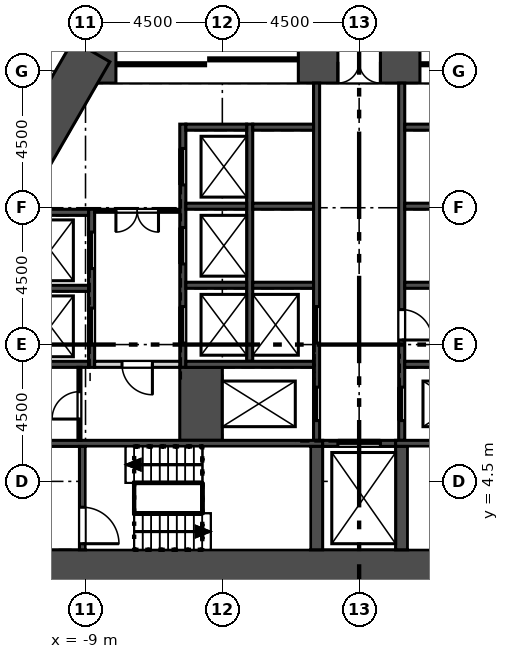
"""IFC4 building model, lengths in metres.
Left out: names, types, materials, properties, quantities, classifications, styles, units other than length and angle.
Written with IfcOpenShell. Run it as: python <this file> out.ifc"""

import sys

from ifc_helpers import new_model, si_unit, direction, frame, frame_2d, origin, place, context, subcontext, project, spatial, rectangle, extrude, element, fill, save


model = new_model("IFC4")
c1 = context("Model", 3, precision=1e-05, world=origin(), true_north=direction((0.0, 1.0)))
c2 = subcontext(c1, "Body", "Model", "MODEL_VIEW")
j1 = project(units=[si_unit("LENGTHUNIT", "METRE"), si_unit("PLANEANGLEUNIT", "RADIAN")], contexts=[c1])
p1 = place(None, origin())
s1 = spatial("IfcSite", under=j1, at=p1, CompositionType="ELEMENT")
p2 = place(p1, origin())
s2 = spatial("IfcBuilding", under=s1, at=p2, CompositionType="ELEMENT")
p3 = place(p2, frame((0.0, 0.0, 8.0)))
s3 = spatial("IfcBuildingStorey", under=s2, at=p3, CompositionType="ELEMENT", Elevation=8.0)
p4 = place(p3, frame((-14.0, 1.55, 0.0), z_axis=(0.0, 0.0, 1.0), x_axis=(1.0, 0.0, 0.0)))
e1 = element("IfcWall", 1, at=p4, inside=s3, PredefinedType="SHEAR", context=c2, shape_type="SweptSolid", body=[
    extrude(rectangle(XDim=28.0, YDim=1.4, at=frame_2d((14.0, 0.0))), origin(), (0.0, 0.0, 1.0), 6.0),
])
p5 = place(p3, frame((9.412, 18.3, 0.0), z_axis=(0.0, 0.0, 1.0), x_axis=(-1.0, 0.0, 0.0)))
e2 = element("IfcWall", 2, at=p5, inside=s3, PredefinedType="SHEAR", context=c2, shape_type="SweptSolid", body=[
    extrude(rectangle(XDim=18.823, YDim=1.4, at=frame_2d((9.412, 0.0))), origin(), (0.0, 0.0, 1.0), 6.0),
])
p6 = place(p5, frame((8.711, 0.0, 0.0)))
e3 = element("IfcOpeningElement", 3, at=p6, cuts=e2, PredefinedType="OPENING", context=c2, shape_type="SweptSolid", body=[
    extrude(rectangle(XDim=1.4, YDim=2.1, at=frame_2d((0.7, 1.05))), frame((0.0, 0.71, 0.0), z_axis=(0.0, -1.0, 0.0), x_axis=(1.0, 0.0, 0.0)), (0.0, 0.0, 1.0), 1.42),
])
p7 = place(p5, frame((11.412, 0.0, 0.0)))
e4 = element("IfcOpeningElement", 4, at=p7, cuts=e2, PredefinedType="OPENING", context=c2, shape_type="SweptSolid", body=[
    extrude(rectangle(XDim=6.0, YDim=2.4, at=frame_2d((3.0, 1.2))), frame((0.0, 0.71, 0.0), z_axis=(0.0, -1.0, 0.0), x_axis=(1.0, 0.0, 0.0)), (0.0, 0.0, 1.0), 1.42),
])
p8 = place(p5, frame((1.412, 0.0, 0.0)))
e5 = element("IfcOpeningElement", 5, at=p8, cuts=e2, PredefinedType="OPENING", context=c2, shape_type="SweptSolid", body=[
    extrude(rectangle(XDim=6.0, YDim=2.4, at=frame_2d((3.0, 1.2))), frame((0.0, 0.71, 0.0), z_axis=(0.0, -1.0, 0.0), x_axis=(1.0, 0.0, 0.0)), (0.0, 0.0, 1.0), 1.42),
])
p9 = place(p3, frame((-8.805, 18.65, 0.0), z_axis=(0.0, 0.0, 1.0), x_axis=(-0.50000187635, -0.866024320471, 0.0)))
e6 = element("IfcWall", 6, at=p9, inside=s3, PredefinedType="SHEAR", context=c2, shape_type="SweptSolid", body=[
    extrude(rectangle(XDim=9.177, YDim=1.4, at=frame_2d((4.588, 0.0))), origin(), (0.0, 0.0, 1.0), 6.0),
])
p10 = place(p3, frame((-8.8, 8.25, -0.3), z_axis=(0.0, 0.0, 1.0), x_axis=(0.0, 1.0, 0.0)))
e7 = element("IfcWall", 7, at=p10, inside=s3, PredefinedType="SOLIDWALL", context=c2, shape_type="SweptSolid", body=[
    extrude(rectangle(XDim=5.2, YDim=0.2, at=frame_2d((2.6, 0.0))), origin(), (0.0, 0.0, 1.0), 6.0),
])
p11 = place(p10, frame((0.75, 0.0, 0.3)))
e8 = element("IfcOpeningElement", 8, at=p11, cuts=e7, PredefinedType="OPENING", context=c2, shape_type="SweptSolid", body=[
    extrude(rectangle(XDim=1.2, YDim=2.1, at=frame_2d((0.6, 1.05))), frame((0.0, 0.11, 0.0), z_axis=(0.0, -1.0, 0.0), x_axis=(1.0, 0.0, 0.0)), (0.0, 0.0, 1.0), 0.22),
])
p12 = place(p10, frame((3.25, 0.0, 0.3)))
e9 = element("IfcOpeningElement", 9, at=p12, cuts=e7, PredefinedType="OPENING", context=c2, shape_type="SweptSolid", body=[
    extrude(rectangle(XDim=1.2, YDim=2.1, at=frame_2d((0.6, 1.05))), frame((0.0, 0.11, 0.0), z_axis=(0.0, -1.0, 0.0), x_axis=(1.0, 0.0, 0.0)), (0.0, 0.0, 1.0), 0.22),
])
p13 = place(p3, frame((-5.8, 8.25, -0.3), z_axis=(0.0, 0.0, 1.0), x_axis=(0.0, 1.0, 0.0)))
e10 = element("IfcWall", 10, at=p13, inside=s3, PredefinedType="SOLIDWALL", context=c2, shape_type="SweptSolid", body=[
    extrude(rectangle(XDim=8.0, YDim=0.2, at=frame_2d((4.0, 0.0))), origin(), (0.0, 0.0, 1.0), 6.0),
])
p14 = place(p13, frame((0.8, 0.0, 0.3)))
e11 = element("IfcOpeningElement", 11, at=p14, cuts=e10, PredefinedType="OPENING", context=c2, shape_type="SweptSolid", body=[
    extrude(rectangle(XDim=1.2, YDim=2.1, at=frame_2d((0.6, 1.05))), frame((0.0, 0.11, 0.0), z_axis=(0.0, -1.0, 0.0), x_axis=(1.0, 0.0, 0.0)), (0.0, 0.0, 1.0), 0.22),
])
p15 = place(p13, frame((3.4, 0.0, 0.3)))
e12 = element("IfcOpeningElement", 12, at=p15, cuts=e10, PredefinedType="OPENING", context=c2, shape_type="SweptSolid", body=[
    extrude(rectangle(XDim=1.2, YDim=2.1, at=frame_2d((0.6, 1.05))), frame((0.0, 0.11, 0.0), z_axis=(0.0, -1.0, 0.0), x_axis=(1.0, 0.0, 0.0)), (0.0, 0.0, 1.0), 0.22),
])
p16 = place(p13, frame((6.0, 0.0, 0.3)))
e13 = element("IfcOpeningElement", 13, at=p16, cuts=e10, PredefinedType="OPENING", context=c2, shape_type="SweptSolid", body=[
    extrude(rectangle(XDim=1.2, YDim=2.1, at=frame_2d((0.6, 1.05))), frame((0.0, 0.11, 0.0), z_axis=(0.0, -1.0, 0.0), x_axis=(1.0, 0.0, 0.0)), (0.0, 0.0, 1.0), 0.22),
])
p17 = place(p3, frame((-3.6, 8.45, -0.3), z_axis=(0.0, 0.0, 1.0), x_axis=(0.0, 1.0, 0.0)))
e14 = element("IfcWall", 14, at=p17, inside=s3, PredefinedType="SOLIDWALL", context=c2, shape_type="SweptSolid", body=[
    extrude(rectangle(XDim=7.8, YDim=0.2, at=frame_2d((3.9, 0.0))), origin(), (0.0, 0.0, 1.0), 6.0),
])
p18 = place(p3, frame((-1.4, 5.85, -0.3), z_axis=(0.0, 0.0, 1.0), x_axis=(0.0, 1.0, 0.0)))
e15 = element("IfcWall", 15, at=p18, inside=s3, PredefinedType="SOLIDWALL", context=c2, shape_type="SweptSolid", body=[
    extrude(rectangle(XDim=11.75, YDim=0.2, at=frame_2d((5.875, 0.0))), origin(), (0.0, 0.0, 1.0), 6.0),
])
p19 = place(p18, frame((3.2, 0.0, 0.3)))
e16 = element("IfcOpeningElement", 16, at=p19, cuts=e15, PredefinedType="OPENING", context=c2, shape_type="SweptSolid", body=[
    extrude(rectangle(XDim=1.2, YDim=2.1, at=frame_2d((0.6, 1.05))), frame((0.0, 0.11, 0.0), z_axis=(0.0, -1.0, 0.0), x_axis=(1.0, 0.0, 0.0)), (0.0, 0.0, 1.0), 0.22),
])
p20 = place(p18, frame((0.65, 0.0, 0.3)))
e17 = element("IfcOpeningElement", 17, at=p20, cuts=e15, PredefinedType="OPENING", context=c2, shape_type="SweptSolid", body=[
    extrude(rectangle(XDim=1.1, YDim=2.1, at=frame_2d((0.55, 1.05))), frame((0.0, 0.11, 0.0), z_axis=(0.0, -1.0, 0.0), x_axis=(1.0, 0.0, 0.0)), (0.0, 0.0, 1.0), 0.22),
])
p21 = place(p3, frame((1.4, 5.85, -0.3), z_axis=(0.0, 0.0, 1.0), x_axis=(0.0, 1.0, 0.0)))
e18 = element("IfcWall", 18, at=p21, inside=s3, PredefinedType="SOLIDWALL", context=c2, shape_type="SweptSolid", body=[
    extrude(rectangle(XDim=11.75, YDim=0.2, at=frame_2d((5.875, 0.0))), origin(), (0.0, 0.0, 1.0), 6.0),
])
p22 = place(p21, frame((0.65, 0.0, 0.3)))
e19 = element("IfcOpeningElement", 19, at=p22, cuts=e18, PredefinedType="OPENING", context=c2, shape_type="SweptSolid", body=[
    extrude(rectangle(XDim=1.1, YDim=2.1, at=frame_2d((0.55, 1.05))), frame((0.0, 0.11, 0.0), z_axis=(0.0, -1.0, 0.0), x_axis=(1.0, 0.0, 0.0)), (0.0, 0.0, 1.0), 0.22),
])
p23 = place(p21, frame((3.3, 0.0, 0.3)))
e20 = element("IfcOpeningElement", 20, at=p23, cuts=e18, PredefinedType="OPENING", context=c2, shape_type="SweptSolid", body=[
    extrude(rectangle(XDim=1.0, YDim=2.1, at=frame_2d((0.5, 1.05))), frame((0.0, 0.11, 0.0), z_axis=(0.0, -1.0, 0.0), x_axis=(1.0, 0.0, 0.0)), (0.0, 0.0, 1.0), 0.22),
])
p24 = place(p3, frame((-5.2, 5.85, -0.3), z_axis=(0.0, 0.0, 1.0), x_axis=(0.0, 1.0, 0.0)))
e21 = element("IfcWall", 21, at=p24, inside=s3, PredefinedType="SOLIDWALL", context=c2, shape_type="SweptSolid", body=[
    extrude(rectangle(XDim=2.4, YDim=1.4, at=frame_2d((1.2, 0.0))), origin(), (0.0, 0.0, 1.0), 6.0),
])
p25 = place(p3, frame((-10.9, 8.35, -0.3), z_axis=(0.0, 0.0, 1.0), x_axis=(1.0, 0.0, 0.0)))
e22 = element("IfcWall", 22, at=p25, inside=s3, PredefinedType="SOLIDWALL", context=c2, shape_type="SweptSolid", body=[
    extrude(rectangle(XDim=2.0, YDim=0.2, at=frame_2d((1.0, 0.0))), origin(), (0.0, 0.0, 1.0), 6.0),
])
for number, where, z_axis, x_axis in (
    (23, (-5.7, 8.35, -0.3), (0.0, 0.0, 1.0), (1.0, 0.0, 0.0)),
    (24, (1.5, 8.35, -0.3), (0.0, 0.0, 1.0), (1.0, 0.0, 0.0)),
):
    element("IfcWall", number, at=place(p3, frame(where, z_axis=z_axis, x_axis=x_axis)), inside=s3, PredefinedType="SOLIDWALL", context=c2, shape_type="SweptSolid", body=[
        extrude(rectangle(XDim=4.2, YDim=0.2, at=frame_2d((2.1, 0.0))), origin(), (0.0, 0.0, 1.0), 6.0),
    ])
p26 = place(p3, frame((-12.6, 5.75, -0.3), z_axis=(0.0, 0.0, 1.0), x_axis=(1.0, 0.0, 0.0)))
e25 = element("IfcWall", 25, at=p26, inside=s3, PredefinedType="SOLIDWALL", context=c2, shape_type="SweptSolid", body=[
    extrude(rectangle(XDim=11.4, YDim=0.2, at=frame_2d((5.7, 0.0))), origin(), (0.0, 0.0, 1.0), 6.0),
])
p27 = place(p3, frame((-1.2, 5.75, -0.3), z_axis=(0.0, 0.0, 1.0), x_axis=(1.0, 0.0, 0.0)))
e26 = element("IfcWall", 26, at=p27, inside=s3, PredefinedType="SOLIDWALL", context=c2, shape_type="SweptSolid", body=[
    extrude(rectangle(XDim=2.4, YDim=0.2, at=frame_2d((1.2, 0.0))), origin(), (0.0, 0.0, 1.0), 6.0),
])
p28 = place(p27, frame((0.5, 0.0, 0.3)))
e27 = element("IfcOpeningElement", 27, at=p28, cuts=e26, PredefinedType="OPENING", context=c2, shape_type="SweptSolid", body=[
    extrude(rectangle(XDim=1.4, YDim=2.1, at=frame_2d((0.7, 1.05))), frame((0.0, 0.11, 0.0), z_axis=(0.0, -1.0, 0.0), x_axis=(1.0, 0.0, 0.0)), (0.0, 0.0, 1.0), 0.22),
])
p29 = place(p3, frame((1.2, 5.75, -0.3), z_axis=(0.0, 0.0, 1.0), x_axis=(1.0, 0.0, 0.0)))
e28 = element("IfcWall", 28, at=p29, inside=s3, PredefinedType="SOLIDWALL", context=c2, shape_type="SweptSolid", body=[
    extrude(rectangle(XDim=11.4, YDim=0.2, at=frame_2d((5.7, 0.0))), origin(), (0.0, 0.0, 1.0), 6.0),
])
p30 = place(p3, frame((-9.1, 2.25, -0.3), z_axis=(0.0, 0.0, 1.0), x_axis=(0.0, 1.0, 0.0)))
e29 = element("IfcWall", 29, at=p30, inside=s3, PredefinedType="SOLIDWALL", context=c2, shape_type="SweptSolid", body=[
    extrude(rectangle(XDim=3.4, YDim=0.2, at=frame_2d((1.7, 0.0))), origin(), (0.0, 0.0, 1.0), 6.0),
])
p31 = place(p30, frame((0.2, 0.0, 0.3)))
e30 = element("IfcOpeningElement", 30, at=p31, cuts=e29, PredefinedType="OPENING", context=c2, shape_type="SweptSolid", body=[
    extrude(rectangle(XDim=1.2, YDim=2.1, at=frame_2d((0.6, 1.05))), frame((0.0, 0.11, 0.0), z_axis=(0.0, -1.0, 0.0), x_axis=(1.0, 0.0, 0.0)), (0.0, 0.0, 1.0), 0.22),
])
for number, where, z_axis, x_axis in (
    (31, (-1.4, 2.25, -0.3), (0.0, 0.0, 1.0), (0.0, 1.0, 0.0)),
    (32, (1.4, 2.25, -0.3), (0.0, 0.0, 1.0), (0.0, 1.0, 0.0)),
):
    element("IfcWall", number, at=place(p3, frame(where, z_axis=z_axis, x_axis=x_axis)), inside=s3, PredefinedType="SOLIDWALL", context=c2, shape_type="SweptSolid", body=[
        extrude(rectangle(XDim=3.4, YDim=0.4, at=frame_2d((1.7, 0.0))), origin(), (0.0, 0.0, 1.0), 6.0),
    ])
for number, where, z_axis, x_axis in (
    (33, (-10.9, 10.85, -0.3), (0.0, 0.0, 1.0), (1.0, 0.0, 0.0)),
    (34, (-10.9, 13.35, -0.3), (0.0, 0.0, 1.0), (1.0, 0.0, 0.0)),
    (35, (-5.7, 10.95, -0.3), (0.0, 0.0, 1.0), (1.0, 0.0, 0.0)),
    (36, (-5.7, 13.55, -0.3), (0.0, 0.0, 1.0), (1.0, 0.0, 0.0)),
    (37, (-5.7, 16.15, -0.3), (0.0, 0.0, 1.0), (1.0, 0.0, 0.0)),
    (38, (-3.5, 10.95, -0.3), (0.0, 0.0, 1.0), (1.0, 0.0, 0.0)),
    (39, (-3.5, 13.55, -0.3), (0.0, 0.0, 1.0), (1.0, 0.0, 0.0)),
    (40, (-3.5, 16.15, -0.3), (0.0, 0.0, 1.0), (1.0, 0.0, 0.0)),
    (41, (1.5, 10.95, -0.3), (0.0, 0.0, 1.0), (1.0, 0.0, 0.0)),
    (42, (1.5, 13.55, -0.3), (0.0, 0.0, 1.0), (1.0, 0.0, 0.0)),
    (43, (1.5, 16.15, -0.3), (0.0, 0.0, 1.0), (1.0, 0.0, 0.0)),
):
    element("IfcWall", number, at=place(p3, frame(where, z_axis=z_axis, x_axis=x_axis)), inside=s3, PredefinedType="SOLIDWALL", context=c2, shape_type="SweptSolid", body=[
        extrude(rectangle(XDim=2.0, YDim=0.2, at=frame_2d((1.0, 0.0))), origin(), (0.0, 0.0, 1.0), 6.0),
    ])
p32 = place(p3, frame((-8.7, 13.4, 0.0), z_axis=(0.0, 0.0, 1.0), x_axis=(1.0, 0.0, 0.0)))
e44 = element("IfcWall", 44, at=p32, inside=s3, PredefinedType="PARTITIONING", context=c2, shape_type="SweptSolid", body=[
    extrude(rectangle(XDim=2.8, YDim=0.1, at=frame_2d((1.4, 0.0))), origin(), (0.0, 0.0, 1.0), 5.7),
])
p33 = place(p32, frame((0.7, 0.0, 0.0)))
e45 = element("IfcOpeningElement", 45, at=p33, cuts=e44, PredefinedType="OPENING", context=c2, shape_type="SweptSolid", body=[
    extrude(rectangle(XDim=1.4, YDim=2.1, at=frame_2d((0.7, 1.05))), frame((0.0, 0.06, 0.0), z_axis=(0.0, -1.0, 0.0), x_axis=(1.0, 0.0, 0.0)), (0.0, 0.0, 1.0), 0.12),
])
p34 = place(p3, frame((-9.2, 5.85, 0.0), z_axis=(0.0, 0.0, 1.0), x_axis=(0.0, 1.0, 0.0)))
e46 = element("IfcWall", 46, at=p34, inside=s3, PredefinedType="PARTITIONING", context=c2, shape_type="SweptSolid", body=[
    extrude(rectangle(XDim=2.4, YDim=0.1, at=frame_2d((1.2, 0.0))), origin(), (0.0, 0.0, 1.0), 5.7),
])
p35 = place(p34, frame((0.7, 0.0, 0.0)))
e47 = element("IfcOpeningElement", 47, at=p35, cuts=e46, PredefinedType="OPENING", context=c2, shape_type="SweptSolid", body=[
    extrude(rectangle(XDim=0.9, YDim=2.1, at=frame_2d((0.45, 1.05))), frame((0.0, 0.06, 0.0), z_axis=(0.0, -1.0, 0.0), x_axis=(1.0, 0.0, 0.0)), (0.0, 0.0, 1.0), 0.12),
])
p36 = place(p3, frame((-8.7, 8.35, 0.0), z_axis=(0.0, 0.0, 1.0), x_axis=(1.0, 0.0, 0.0)))
e48 = element("IfcWall", 48, at=p36, inside=s3, PredefinedType="SOLIDWALL", context=c2, shape_type="SweptSolid", body=[
    extrude(rectangle(XDim=2.8, YDim=0.2, at=frame_2d((1.4, 0.0))), origin(), (0.0, 0.0, 1.0), 5.7),
])
p37 = place(p36, frame((0.9, 0.0, 0.0)))
e49 = element("IfcOpeningElement", 49, at=p37, cuts=e48, PredefinedType="OPENING", context=c2, shape_type="SweptSolid", body=[
    extrude(rectangle(XDim=1.0, YDim=2.1, at=frame_2d((0.5, 1.05))), frame((0.0, 0.11, 0.0), z_axis=(0.0, -1.0, 0.0), x_axis=(1.0, 0.0, 0.0)), (0.0, 0.0, 1.0), 0.22),
])
p38 = place(p11, origin())
e50 = element("IfcDoor", 50, at=p38, inside=s3, OperationType="SLIDING_TO_LEFT", PredefinedType="DOOR", context=c2, shape_type="SweptSolid", body=[
    extrude(rectangle(XDim=1.2, YDim=2.1, at=frame_2d((0.6, 1.05))), frame((0.0, 0.025, 0.0), z_axis=(0.0, -1.0, 0.0), x_axis=(1.0, 0.0, 0.0)), (0.0, 0.0, 1.0), 0.05),
])
fill(e8, e50)
p39 = place(p12, origin())
e51 = element("IfcDoor", 51, at=p39, inside=s3, OperationType="SLIDING_TO_LEFT", PredefinedType="DOOR", context=c2, shape_type="SweptSolid", body=[
    extrude(rectangle(XDim=1.2, YDim=2.1, at=frame_2d((0.6, 1.05))), frame((0.0, 0.025, 0.0), z_axis=(0.0, -1.0, 0.0), x_axis=(1.0, 0.0, 0.0)), (0.0, 0.0, 1.0), 0.05),
])
fill(e9, e51)
p40 = place(p14, origin())
e52 = element("IfcDoor", 52, at=p40, inside=s3, OperationType="SLIDING_TO_LEFT", PredefinedType="DOOR", context=c2, shape_type="SweptSolid", body=[
    extrude(rectangle(XDim=1.2, YDim=2.1, at=frame_2d((0.6, 1.05))), frame((0.0, 0.025, 0.0), z_axis=(0.0, -1.0, 0.0), x_axis=(1.0, 0.0, 0.0)), (0.0, 0.0, 1.0), 0.05),
])
fill(e11, e52)
p41 = place(p15, origin())
e53 = element("IfcDoor", 53, at=p41, inside=s3, OperationType="SLIDING_TO_LEFT", PredefinedType="DOOR", context=c2, shape_type="SweptSolid", body=[
    extrude(rectangle(XDim=1.2, YDim=2.1, at=frame_2d((0.6, 1.05))), frame((0.0, 0.025, 0.0), z_axis=(0.0, -1.0, 0.0), x_axis=(1.0, 0.0, 0.0)), (0.0, 0.0, 1.0), 0.05),
])
fill(e12, e53)
p42 = place(p16, origin())
e54 = element("IfcDoor", 54, at=p42, inside=s3, OperationType="SLIDING_TO_LEFT", PredefinedType="DOOR", context=c2, shape_type="SweptSolid", body=[
    extrude(rectangle(XDim=1.2, YDim=2.1, at=frame_2d((0.6, 1.05))), frame((0.0, 0.025, 0.0), z_axis=(0.0, -1.0, 0.0), x_axis=(1.0, 0.0, 0.0)), (0.0, 0.0, 1.0), 0.05),
])
fill(e13, e54)
p43 = place(p19, origin())
e55 = element("IfcDoor", 55, at=p43, inside=s3, OperationType="SLIDING_TO_LEFT", PredefinedType="DOOR", context=c2, shape_type="SweptSolid", body=[
    extrude(rectangle(XDim=1.2, YDim=2.1, at=frame_2d((0.6, 1.05))), frame((0.0, 0.025, 0.0), z_axis=(0.0, -1.0, 0.0), x_axis=(1.0, 0.0, 0.0)), (0.0, 0.0, 1.0), 0.05),
])
fill(e16, e55)
p44 = place(p20, origin())
e56 = element("IfcDoor", 56, at=p44, inside=s3, OperationType="SLIDING_TO_RIGHT", PredefinedType="DOOR", context=c2, shape_type="SweptSolid", body=[
    extrude(rectangle(XDim=1.1, YDim=2.1, at=frame_2d((0.55, 1.05))), frame((0.0, 0.025, 0.0), z_axis=(0.0, -1.0, 0.0), x_axis=(1.0, 0.0, 0.0)), (0.0, 0.0, 1.0), 0.05),
])
fill(e17, e56)
p45 = place(p22, origin())
e57 = element("IfcDoor", 57, at=p45, inside=s3, OperationType="SLIDING_TO_RIGHT", PredefinedType="DOOR", context=c2, shape_type="SweptSolid", body=[
    extrude(rectangle(XDim=1.1, YDim=2.1, at=frame_2d((0.55, 1.05))), frame((0.0, 0.025, 0.0), z_axis=(0.0, -1.0, 0.0), x_axis=(1.0, 0.0, 0.0)), (0.0, 0.0, 1.0), 0.05),
])
fill(e19, e57)
p46 = place(p28, origin())
e58 = element("IfcDoor", 58, at=p46, inside=s3, OperationType="SLIDING_TO_LEFT", PredefinedType="DOOR", context=c2, shape_type="SweptSolid", body=[
    extrude(rectangle(XDim=1.4, YDim=2.1, at=frame_2d((0.7, 1.05))), frame((0.0, 0.025, 0.0), z_axis=(0.0, -1.0, 0.0), x_axis=(1.0, 0.0, 0.0)), (0.0, 0.0, 1.0), 0.05),
])
fill(e27, e58)
p47 = place(p23, frame((1.0, 0.0, 0.0), z_axis=(0.0, 0.0, 1.0), x_axis=(-1.0, 0.0, 0.0)))
e59 = element("IfcDoor", 59, at=p47, inside=s3, OperationType="SINGLE_SWING_RIGHT", PredefinedType="DOOR", context=c2, shape_type="SweptSolid", body=[
    extrude(rectangle(XDim=1.0, YDim=2.1, at=frame_2d((0.5, 1.05))), frame((0.0, 0.025, 0.0), z_axis=(0.0, -1.0, 0.0), x_axis=(1.0, 0.0, 0.0)), (0.0, 0.0, 1.0), 0.05),
])
fill(e20, e59)
p48 = place(p33, frame((1.4, 0.0, 0.0), z_axis=(0.0, 0.0, 1.0), x_axis=(-1.0, 0.0, 0.0)))
e60 = element("IfcDoor", 60, at=p48, inside=s3, OperationType="DOUBLE_DOOR_SINGLE_SWING", PredefinedType="DOOR", context=c2, shape_type="SweptSolid", body=[
    extrude(rectangle(XDim=1.4, YDim=2.1, at=frame_2d((0.7, 1.05))), frame((0.0, 0.025, 0.0), z_axis=(0.0, -1.0, 0.0), x_axis=(1.0, 0.0, 0.0)), (0.0, 0.0, 1.0), 0.05),
])
fill(e45, e60)
p49 = place(p37, frame((1.0, 0.0, 0.0), z_axis=(0.0, 0.0, 1.0), x_axis=(-1.0, 0.0, 0.0)))
e61 = element("IfcDoor", 61, at=p49, inside=s3, OperationType="SINGLE_SWING_LEFT", PredefinedType="DOOR", context=c2, shape_type="SweptSolid", body=[
    extrude(rectangle(XDim=1.0, YDim=2.1, at=frame_2d((0.5, 1.05))), frame((0.0, 0.025, 0.0), z_axis=(0.0, -1.0, 0.0), x_axis=(1.0, 0.0, 0.0)), (0.0, 0.0, 1.0), 0.05),
])
fill(e49, e61)
p50 = place(p35, origin())
e62 = element("IfcDoor", 62, at=p50, inside=s3, OperationType="SINGLE_SWING_LEFT", PredefinedType="DOOR", context=c2, shape_type="SweptSolid", body=[
    extrude(rectangle(XDim=0.9, YDim=2.1, at=frame_2d((0.45, 1.05))), frame((0.0, 0.025, 0.0), z_axis=(0.0, -1.0, 0.0), x_axis=(1.0, 0.0, 0.0)), (0.0, 0.0, 1.0), 0.05),
])
fill(e47, e62)
p51 = place(p31, frame((1.2, 0.0, 0.0), z_axis=(0.0, 0.0, 1.0), x_axis=(-1.0, 0.0, 0.0)))
e63 = element("IfcDoor", 63, at=p51, inside=s3, OperationType="SINGLE_SWING_RIGHT", PredefinedType="DOOR", context=c2, shape_type="SweptSolid", body=[
    extrude(rectangle(XDim=1.2, YDim=2.1, at=frame_2d((0.6, 1.05))), frame((0.0, 0.025, 0.0), z_axis=(0.0, -1.0, 0.0), x_axis=(1.0, 0.0, 0.0)), (0.0, 0.0, 1.0), 0.05),
])
fill(e30, e63)
p52 = place(p6, origin())
e64 = element("IfcDoor", 64, at=p52, inside=s3, OperationType="DOUBLE_DOOR_SINGLE_SWING", PredefinedType="DOOR", context=c2, shape_type="SweptSolid", body=[
    extrude(rectangle(XDim=1.4, YDim=2.1, at=frame_2d((0.7, 1.05))), frame((0.0, 0.025, 0.0), z_axis=(0.0, -1.0, 0.0), x_axis=(1.0, 0.0, 0.0)), (0.0, 0.0, 1.0), 0.05),
])
fill(e3, e64)
p53 = place(p7, origin())
e65 = element("IfcDoor", 65, at=p53, inside=s3, OperationType="DOUBLE_DOOR_SLIDING", PredefinedType="DOOR", context=c2, shape_type="SweptSolid", body=[
    extrude(rectangle(XDim=6.0, YDim=2.4, at=frame_2d((3.0, 1.2))), frame((0.0, 0.025, 0.0), z_axis=(0.0, -1.0, 0.0), x_axis=(1.0, 0.0, 0.0)), (0.0, 0.0, 1.0), 0.05),
])
fill(e4, e65)
p54 = place(p8, origin())
e66 = element("IfcDoor", 66, at=p54, inside=s3, OperationType="DOUBLE_DOOR_SLIDING", PredefinedType="DOOR", context=c2, shape_type="SweptSolid", body=[
    extrude(rectangle(XDim=6.0, YDim=2.4, at=frame_2d((3.0, 1.2))), frame((0.0, 0.025, 0.0), z_axis=(0.0, -1.0, 0.0), x_axis=(1.0, 0.0, 0.0)), (0.0, 0.0, 1.0), 0.05),
])
fill(e5, e66)
save(model, sys.argv[1])
